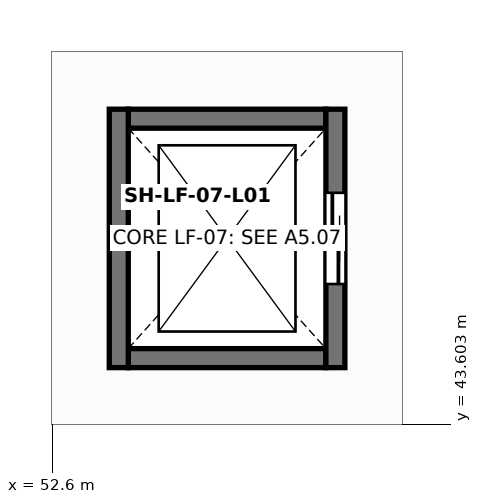
"""IFC4 building model, lengths in metres.
Left out: names, types, materials, properties, quantities, classifications, styles, units other than length and angle.
Written with IfcOpenShell. Run it as: python <this file> out.ifc"""

import sys

from ifc_helpers import new_model, si_unit, direction, frame, frame_2d, origin, place, context, subcontext, project, spatial, rectangle, extrude, element, fill, save


model = new_model("IFC4")
c1 = context("Model", 3, precision=1e-05, world=origin(), true_north=direction((0.0, 1.0)))
c2 = subcontext(c1, "Body", "Model", "MODEL_VIEW")
j1 = project(units=[si_unit("LENGTHUNIT", "METRE"), si_unit("PLANEANGLEUNIT", "RADIAN")], contexts=[c1])
p1 = place(None, origin())
s1 = spatial("IfcSite", under=j1, at=p1, CompositionType="ELEMENT")
p2 = place(p1, origin())
s2 = spatial("IfcBuilding", under=s1, at=p2, CompositionType="ELEMENT")
p3 = place(p2, frame((0.0, 0.0, 6.0)))
s3 = spatial("IfcBuildingStorey", under=s2, at=p3, CompositionType="ELEMENT", Elevation=6.0)
for number, where, z_axis, x_axis in (
    (1, (53.6, 44.475, 0.0), (0.0, 0.0, 1.0), (1.0, 0.0, 0.0)),
    (2, (56.2, 47.625, 0.0), (0.0, 0.0, 1.0), (-1.0, 0.0, 0.0)),
):
    element("IfcWall", number, at=place(p3, frame(where, z_axis=z_axis, x_axis=x_axis)), inside=s3, PredefinedType="SOLIDWALL", context=c2, shape_type="SweptSolid", body=[
        extrude(rectangle(XDim=2.6, YDim=0.25, at=frame_2d((1.3, 0.0))), origin(), (0.0, 0.0, 1.0), 4.945),
    ])
p4 = place(p3, frame((56.325, 44.35, 0.0), z_axis=(0.0, 0.0, 1.0), x_axis=(0.0, 1.0, 0.0)))
e3 = element("IfcWall", 3, at=p4, inside=s3, PredefinedType="SOLIDWALL", context=c2, shape_type="SweptSolid", body=[
    extrude(rectangle(XDim=3.4, YDim=0.25, at=frame_2d((1.7, 0.0))), origin(), (0.0, 0.0, 1.0), 4.945),
])
p5 = place(p4, frame((1.1, 0.0, 0.0)))
e4 = element("IfcOpeningElement", 4, at=p5, cuts=e3, PredefinedType="OPENING", context=c2, shape_type="SweptSolid", body=[
    extrude(rectangle(XDim=1.2, YDim=2.2, at=frame_2d((0.6, 1.1))), frame((0.0, 0.135, 0.0), z_axis=(0.0, -1.0, 0.0), x_axis=(1.0, 0.0, 0.0)), (0.0, 0.0, 1.0), 0.27),
])
p6 = place(p3, frame((53.475, 47.75, 0.0), z_axis=(0.0, 0.0, 1.0), x_axis=(0.0, -1.0, 0.0)))
e5 = element("IfcWall", 5, at=p6, inside=s3, PredefinedType="SOLIDWALL", context=c2, shape_type="SweptSolid", body=[
    extrude(rectangle(XDim=3.4, YDim=0.25, at=frame_2d((1.7, 0.0))), origin(), (0.0, 0.0, 1.0), 4.945),
])
p7 = place(p5, frame((1.2, 0.0, 0.0), z_axis=(0.0, 0.0, 1.0), x_axis=(-1.0, 0.0, 0.0)))
e6 = element("IfcDoor", 6, at=p7, inside=s3, OperationType="DOUBLE_DOOR_SLIDING", PredefinedType="DOOR", context=c2, shape_type="SweptSolid", body=[
    extrude(rectangle(XDim=1.2, YDim=2.2, at=frame_2d((0.6, 1.1))), frame((0.0, 0.025, 0.0), z_axis=(0.0, -1.0, 0.0), x_axis=(1.0, 0.0, 0.0)), (0.0, 0.0, 1.0), 0.05),
])
fill(e4, e6)
save(model, sys.argv[1])
